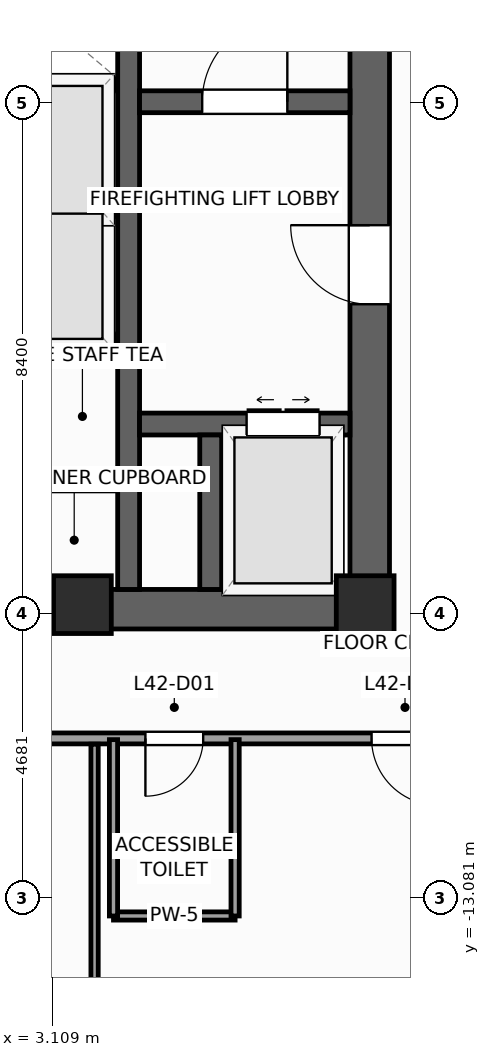
"""IFC4 building model, lengths in metres.
Left out: names, types, materials, properties, quantities, classifications, styles, units other than length and angle.
Written with IfcOpenShell. Run it as: python <this file> out.ifc"""

import sys

from ifc_helpers import new_model, si_unit, direction, frame, frame_2d, origin, origin_2d, place, context, subcontext, project, spatial, rectangle, extrude, source, transform, mapped, element, fill, save


model = new_model("IFC4")
c1 = context("Model", 3, precision=1e-05, world=origin(), true_north=direction((0.0, 1.0)))
c2 = subcontext(c1, "Body", "Model", "MODEL_VIEW")
j1 = project(units=[si_unit("LENGTHUNIT", "METRE"), si_unit("PLANEANGLEUNIT", "RADIAN")], contexts=[c1])
p1 = place(None, origin())
s1 = spatial("IfcSite", under=j1, at=p1, CompositionType="ELEMENT")
p2 = place(p1, origin())
s2 = spatial("IfcBuilding", under=s1, at=p2, CompositionType="ELEMENT")
p3 = place(p2, frame((0.0, 0.0, 176.4)))
s3 = spatial("IfcBuildingStorey", under=s2, at=p3, CompositionType="ELEMENT", Elevation=176.4)
p4 = place(p3, frame((-8.65, -8.325, 0.0), z_axis=(0.0, 0.0, 1.0), x_axis=(1.0, 0.0, 0.0)))
e1 = element("IfcWall", 1, at=p4, inside=s3, PredefinedType="SHEAR", context=c2, shape_type="SweptSolid", body=[
    extrude(rectangle(XDim=17.3, YDim=0.65, at=frame_2d((8.65, 0.0))), origin(), (0.0, 0.0, 1.0), 4.0),
])
p5 = place(p4, frame((8.0, 0.0, 0.0)))
e2 = element("IfcOpeningElement", 2, at=p5, cuts=e1, PredefinedType="OPENING", context=c2, shape_type="SweptSolid", body=[
    extrude(rectangle(XDim=1.3, YDim=2.2, at=frame_2d((0.65, 1.1))), frame((0.0, 0.335, 0.0), z_axis=(0.0, -1.0, 0.0), x_axis=(1.0, 0.0, 0.0)), (0.0, 0.0, 1.0), 0.67),
])
p6 = place(p3, frame((8.325, -8.0, 0.0), z_axis=(0.0, 0.0, 1.0), x_axis=(0.0, 1.0, 0.0)))
e3 = element("IfcWall", 3, at=p6, inside=s3, PredefinedType="SHEAR", context=c2, shape_type="SweptSolid", body=[
    extrude(rectangle(XDim=16.0, YDim=0.65, at=frame_2d((8.0, 0.0))), origin(), (0.0, 0.0, 1.0), 4.0),
])
p7 = place(p6, frame((4.69, 0.0, 0.0)))
e4 = element("IfcOpeningElement", 4, at=p7, cuts=e3, PredefinedType="OPENING", context=c2, shape_type="SweptSolid", body=[
    extrude(rectangle(XDim=1.3, YDim=2.2, at=frame_2d((0.65, 1.1))), frame((0.0, 0.335, 0.0), z_axis=(0.0, -1.0, 0.0), x_axis=(1.0, 0.0, 0.0)), (0.0, 0.0, 1.0), 0.67),
])
p8 = place(p3, frame((4.36, -8.0, 0.0), z_axis=(0.0, 0.0, 1.0), x_axis=(0.0, 1.0, 0.0)))
e5 = element("IfcWall", 5, at=p8, inside=s3, PredefinedType="SHEAR", context=c2, shape_type="SweptSolid", body=[
    extrude(rectangle(XDim=16.0, YDim=0.36, at=frame_2d((8.0, 0.0))), origin(), (0.0, 0.0, 1.0), 4.0),
])
p9 = place(p3, frame((4.54, 0.02, 0.0), z_axis=(0.0, 0.0, 1.0), x_axis=(1.0, 0.0, 0.0)))
e6 = element("IfcWall", 6, at=p9, inside=s3, PredefinedType="SHEAR", context=c2, shape_type="SweptSolid", body=[
    extrude(rectangle(XDim=3.46, YDim=0.36, at=frame_2d((1.73, 0.0))), origin(), (0.0, 0.0, 1.0), 4.0),
])
p10 = place(p9, frame((1.03, 0.0, 0.0)))
e7 = element("IfcOpeningElement", 7, at=p10, cuts=e6, PredefinedType="OPENING", context=c2, shape_type="SweptSolid", body=[
    extrude(rectangle(XDim=1.4, YDim=2.2, at=frame_2d((0.7, 1.1))), frame((0.0, 0.19, 0.0), z_axis=(0.0, -1.0, 0.0), x_axis=(1.0, 0.0, 0.0)), (0.0, 0.0, 1.0), 0.38),
])
p11 = place(p3, frame((4.54, -5.28, 0.0), z_axis=(0.0, 0.0, 1.0), x_axis=(1.0, 0.0, 0.0)))
e8 = element("IfcWall", 8, at=p11, inside=s3, PredefinedType="SHEAR", context=c2, shape_type="SweptSolid", body=[
    extrude(rectangle(XDim=3.46, YDim=0.36, at=frame_2d((1.73, 0.0))), origin(), (0.0, 0.0, 1.0), 4.0),
])
p12 = place(p11, frame((1.76, 0.0, 0.0)))
e9 = element("IfcOpeningElement", 9, at=p12, cuts=e8, PredefinedType="OPENING", context=c2, shape_type="SweptSolid", body=[
    extrude(rectangle(XDim=1.2, YDim=2.25, at=frame_2d((0.6, 1.125))), frame((0.0, 0.19, 0.0), z_axis=(0.0, -1.0, 0.0), x_axis=(1.0, 0.0, 0.0)), (0.0, 0.0, 1.0), 0.38),
])
p13 = place(p3, frame((5.71, -8.0, 0.0), z_axis=(0.0, 0.0, 1.0), x_axis=(0.0, 1.0, 0.0)))
e10 = element("IfcWall", 10, at=p13, inside=s3, PredefinedType="SHEAR", context=c2, shape_type="SweptSolid", body=[
    extrude(rectangle(XDim=2.54, YDim=0.36, at=frame_2d((1.27, 0.0))), origin(), (0.0, 0.0, 1.0), 4.0),
])
m1 = source(origin(), c2, "Body", "SweptSolid", [
    extrude(rectangle(XDim=0.95, YDim=0.95, at=origin_2d()), origin(), (0.0, 0.0, 1.0), 4.0),
])
for number, where, z_axis, x_axis in (
    (11, (8.25, -8.25, 0.0), (0.0, 0.0, 1.0), (1.0, 0.0, 0.0)),
    (12, (3.6, -8.25, 0.0), (0.0, 0.0, 1.0), (1.0, 0.0, 0.0)),
):
    element("IfcColumn", number, at=place(p3, frame(where, z_axis=z_axis, x_axis=x_axis)), inside=s3, PredefinedType="PILASTER", context=c2, shape_type="MappedRepresentation", body=[
        mapped(m1, transform((0.0, 0.0, 0.0), scale=1.0)),
    ])
p14 = place(p3, frame((-2.972, -32.558, 0.0), z_axis=(0.0, 0.0, 1.0), x_axis=(0.829036218961, 0.559194910251, 0.0)))
e13 = element("IfcWall", 13, at=p14, inside=s3, PredefinedType="STANDARD", context=c2, shape_type="SweptSolid", body=[
    extrude(rectangle(XDim=41.34, YDim=0.34, at=frame_2d((20.67, 0.0))), origin(), (0.0, 0.0, 1.0), 3.04),
])
p15 = place(p14, frame((14.545, 0.0, 0.0)))
e14 = element("IfcOpeningElement", 14, at=p15, cuts=e13, PredefinedType="OPENING", context=c2, shape_type="SweptSolid", body=[
    extrude(rectangle(XDim=1.05, YDim=2.25, at=frame_2d((0.525, 1.125))), frame((0.0, 0.18, 0.0), z_axis=(0.0, -1.0, 0.0), x_axis=(1.0, 0.0, 0.0)), (0.0, 0.0, 1.0), 0.36),
])
p16 = place(p14, frame((4.261, 0.0, 0.56)))
e15 = element("IfcOpeningElement", 15, at=p16, cuts=e13, PredefinedType="OPENING", context=c2, shape_type="SweptSolid", body=[
    extrude(rectangle(XDim=1.4, YDim=2.4, at=frame_2d((0.7, 1.2))), frame((0.0, 0.18, 0.0), z_axis=(0.0, -1.0, 0.0), x_axis=(1.0, 0.0, 0.0)), (0.0, 0.0, 1.0), 0.36),
])
p17 = place(p14, frame((11.064, 0.0, 0.61)))
e16 = element("IfcOpeningElement", 16, at=p17, cuts=e13, PredefinedType="OPENING", context=c2, shape_type="SweptSolid", body=[
    extrude(rectangle(XDim=1.85, YDim=2.35, at=frame_2d((0.925, 1.175))), frame((0.0, 0.18, 0.0), z_axis=(0.0, -1.0, 0.0), x_axis=(1.0, 0.0, 0.0)), (0.0, 0.0, 1.0), 0.36),
])
p18 = place(p14, frame((16.668, 0.0, 0.61)))
e17 = element("IfcOpeningElement", 17, at=p18, cuts=e13, PredefinedType="OPENING", context=c2, shape_type="SweptSolid", body=[
    extrude(rectangle(XDim=1.85, YDim=2.35, at=frame_2d((0.925, 1.175))), frame((0.0, 0.18, 0.0), z_axis=(0.0, -1.0, 0.0), x_axis=(1.0, 0.0, 0.0)), (0.0, 0.0, 1.0), 0.36),
])
p19 = place(p14, frame((27.186, 0.0, 0.61)))
e18 = element("IfcOpeningElement", 18, at=p19, cuts=e13, PredefinedType="OPENING", context=c2, shape_type="SweptSolid", body=[
    extrude(rectangle(XDim=1.85, YDim=2.35, at=frame_2d((0.925, 1.175))), frame((0.0, 0.18, 0.0), z_axis=(0.0, -1.0, 0.0), x_axis=(1.0, 0.0, 0.0)), (0.0, 0.0, 1.0), 0.36),
])
p20 = place(p14, frame((34.852, 0.0, 0.56)))
e19 = element("IfcOpeningElement", 19, at=p20, cuts=e13, PredefinedType="OPENING", context=c2, shape_type="SweptSolid", body=[
    extrude(rectangle(XDim=1.4, YDim=2.4, at=frame_2d((0.7, 1.2))), frame((0.0, 0.18, 0.0), z_axis=(0.0, -1.0, 0.0), x_axis=(1.0, 0.0, 0.0)), (0.0, 0.0, 1.0), 0.36),
])
for number, where, z_axis, x_axis in (
    (20, (1.89, -3.9, 0.0), (0.0, 0.0, 1.0), (1.0, 0.0, 0.0)),
    (21, (1.89, 0.3, 0.0), (0.0, 0.0, 1.0), (1.0, 0.0, 0.0)),
):
    element("IfcWall", number, at=place(p3, frame(where, z_axis=z_axis, x_axis=x_axis)), inside=s3, PredefinedType="PARTITIONING", context=c2, shape_type="SweptSolid", body=[
        extrude(rectangle(XDim=2.28, YDim=0.18, at=frame_2d((1.14, 0.0))), origin(), (0.0, 0.0, 1.0), 3.74),
    ])
p21 = place(p3, frame((1.9, -1.8, 0.0), z_axis=(0.0, 0.0, 1.0), x_axis=(1.0, 0.0, 0.0)))
e22 = element("IfcWall", 22, at=p21, inside=s3, PredefinedType="PARTITIONING", context=c2, shape_type="SweptSolid", body=[
    extrude(rectangle(XDim=2.26, YDim=0.12, at=frame_2d((1.13, 0.0))), origin(), (0.0, 0.0, 1.0), 3.74),
])
p22 = place(p3, frame((1.89, -6.3, 0.0), z_axis=(0.0, 0.0, 1.0), x_axis=(1.0, 0.0, 0.0)))
e23 = element("IfcWall", 23, at=p22, inside=s3, PredefinedType="PARTITIONING", context=c2, shape_type="SweptSolid", body=[
    extrude(rectangle(XDim=2.28, YDim=0.16, at=frame_2d((1.14, 0.0))), origin(), (0.0, 0.0, 1.0), 3.74),
])
p23 = place(p3, frame((-10.45, -10.45, 0.0), z_axis=(0.0, 0.0, 1.0), x_axis=(1.0, 0.0, 0.0)))
e24 = element("IfcWall", 24, at=p23, inside=s3, PredefinedType="PARTITIONING", context=c2, shape_type="SweptSolid", body=[
    extrude(rectangle(XDim=22.05, YDim=0.18, at=frame_2d((11.025, 0.0))), origin(), (0.0, 0.0, 1.0), 3.74),
])
p24 = place(p23, frame((15.086, 0.0, 0.0)))
e25 = element("IfcOpeningElement", 25, at=p24, cuts=e24, PredefinedType="OPENING", context=c2, shape_type="SweptSolid", body=[
    extrude(rectangle(XDim=0.95, YDim=2.1, at=frame_2d((0.475, 1.05))), frame((0.0, 0.1, 0.0), z_axis=(0.0, -1.0, 0.0), x_axis=(1.0, 0.0, 0.0)), (0.0, 0.0, 1.0), 0.2),
])
p25 = place(p23, frame((7.611, 0.0, 0.0)))
e26 = element("IfcOpeningElement", 26, at=p25, cuts=e24, PredefinedType="OPENING", context=c2, shape_type="SweptSolid", body=[
    extrude(rectangle(XDim=0.95, YDim=2.1, at=frame_2d((0.475, 1.05))), frame((0.0, 0.1, 0.0), z_axis=(0.0, -1.0, 0.0), x_axis=(1.0, 0.0, 0.0)), (0.0, 0.0, 1.0), 0.2),
])
p26 = place(p23, frame((2.939, 0.0, 0.0)))
e27 = element("IfcOpeningElement", 27, at=p26, cuts=e24, PredefinedType="OPENING", context=c2, shape_type="SweptSolid", body=[
    extrude(rectangle(XDim=1.1, YDim=2.2, at=frame_2d((0.55, 1.1))), frame((0.0, 0.1, 0.0), z_axis=(0.0, -1.0, 0.0), x_axis=(1.0, 0.0, 0.0)), (0.0, 0.0, 1.0), 0.2),
])
p27 = place(p23, frame((11.175, 0.0, 0.0)))
e28 = element("IfcOpeningElement", 28, at=p27, cuts=e24, PredefinedType="OPENING", context=c2, shape_type="SweptSolid", body=[
    extrude(rectangle(XDim=1.1, YDim=2.2, at=frame_2d((0.55, 1.1))), frame((0.0, 0.1, 0.0), z_axis=(0.0, -1.0, 0.0), x_axis=(1.0, 0.0, 0.0)), (0.0, 0.0, 1.0), 0.2),
])
p28 = place(p23, frame((18.805, 0.0, 0.0)))
e29 = element("IfcOpeningElement", 29, at=p28, cuts=e24, PredefinedType="OPENING", context=c2, shape_type="SweptSolid", body=[
    extrude(rectangle(XDim=1.1, YDim=2.2, at=frame_2d((0.55, 1.1))), frame((0.0, 0.1, 0.0), z_axis=(0.0, -1.0, 0.0), x_axis=(1.0, 0.0, 0.0)), (0.0, 0.0, 1.0), 0.2),
])
p29 = place(p3, frame((3.8, -27.864, 0.0), z_axis=(0.0, 0.0, 1.0), x_axis=(0.0, 1.0, 0.0)))
e30 = element("IfcWall", 30, at=p29, inside=s3, PredefinedType="PARTITIONING", context=c2, shape_type="SweptSolid", body=[
    extrude(rectangle(XDim=17.319, YDim=0.12, at=frame_2d((8.659, 0.0))), origin(), (0.0, 0.0, 1.0), 3.74),
])
p30 = place(p3, frame((4.111, -13.37, 0.0), z_axis=(0.0, 0.0, 1.0), x_axis=(1.0, 0.0, 0.0)))
e31 = element("IfcWall", 31, at=p30, inside=s3, PredefinedType="PARTITIONING", context=c2, shape_type="SweptSolid", body=[
    extrude(rectangle(XDim=2.0, YDim=0.135, at=frame_2d((1.0, 0.0))), origin(), (0.0, 0.0, 1.0), 2.84),
])
for number, where, z_axis, x_axis in (
    (32, (6.111, -13.37, 0.0), (0.0, 0.0, 1.0), (0.0, 1.0, 0.0)),
    (33, (4.111, -13.37, 0.0), (0.0, 0.0, 1.0), (0.0, 1.0, 0.0)),
):
    element("IfcWall", number, at=place(p3, frame(where, z_axis=z_axis, x_axis=x_axis)), inside=s3, PredefinedType="PARTITIONING", context=c2, shape_type="SweptSolid", body=[
        extrude(rectangle(XDim=2.9, YDim=0.135, at=frame_2d((1.45, 0.0))), origin(), (0.0, 0.0, 1.0), 3.74),
    ])
m2 = source(origin(), c2, "Body", "SweptSolid", [
    extrude(rectangle(XDim=1.4, YDim=2.2, at=frame_2d((0.7, 1.1))), frame((0.0, 0.025, 0.0), z_axis=(0.0, -1.0, 0.0), x_axis=(1.0, 0.0, 0.0)), (0.0, 0.0, 1.0), 0.05),
])
p31 = place(p10, origin())
e34 = element("IfcDoor", 34, at=p31, inside=s3, OperationType="SINGLE_SWING_RIGHT", PredefinedType="DOOR", context=c2, shape_type="MappedRepresentation", body=[
    mapped(m2, transform((0.0, 0.0, 0.0), scale=1.0)),
])
fill(e7, e34)
m3 = source(origin(), c2, "Body", "SweptSolid", [
    extrude(rectangle(XDim=1.3, YDim=2.2, at=frame_2d((0.65, 1.1))), frame((0.0, 0.025, 0.0), z_axis=(0.0, -1.0, 0.0), x_axis=(1.0, 0.0, 0.0)), (0.0, 0.0, 1.0), 0.05),
])
p32 = place(p7, origin())
e35 = element("IfcDoor", 35, at=p32, inside=s3, OperationType="SINGLE_SWING_RIGHT", PredefinedType="DOOR", context=c2, shape_type="MappedRepresentation", body=[
    mapped(m3, transform((0.0, 0.0, 0.0), scale=1.0)),
])
fill(e4, e35)
m4 = source(origin(), c2, "Body", "SweptSolid", [
    extrude(rectangle(XDim=1.2, YDim=2.25, at=frame_2d((0.6, 1.125))), frame((0.0, 0.025, 0.0), z_axis=(0.0, -1.0, 0.0), x_axis=(1.0, 0.0, 0.0)), (0.0, 0.0, 1.0), 0.05),
])
p33 = place(p12, origin())
e36 = element("IfcDoor", 36, at=p33, inside=s3, OperationType="DOUBLE_DOOR_SLIDING", PredefinedType="DOOR", context=c2, shape_type="MappedRepresentation", body=[
    mapped(m4, transform((0.0, 0.0, 0.0), scale=1.0)),
])
fill(e9, e36)
m5 = source(origin(), c2, "Body", "SweptSolid", [
    extrude(rectangle(XDim=0.95, YDim=2.1, at=frame_2d((0.475, 1.05))), frame((0.0, 0.025, 0.0), z_axis=(0.0, -1.0, 0.0), x_axis=(1.0, 0.0, 0.0)), (0.0, 0.0, 1.0), 0.05),
])
p34 = place(p24, frame((0.95, 0.0, 0.0), z_axis=(0.0, 0.0, 1.0), x_axis=(-1.0, 0.0, 0.0)))
e37 = element("IfcDoor", 37, at=p34, inside=s3, OperationType="SINGLE_SWING_LEFT", PredefinedType="DOOR", context=c2, shape_type="MappedRepresentation", body=[
    mapped(m5, transform((0.0, 0.0, 0.0), scale=1.0)),
])
fill(e25, e37)
m6 = source(origin(), c2, "Body", "SweptSolid", [
    extrude(rectangle(XDim=1.1, YDim=2.2, at=frame_2d((0.55, 1.1))), frame((0.0, 0.025, 0.0), z_axis=(0.0, -1.0, 0.0), x_axis=(1.0, 0.0, 0.0)), (0.0, 0.0, 1.0), 0.05),
])
p35 = place(p28, frame((1.1, 0.0, 0.0), z_axis=(0.0, 0.0, 1.0), x_axis=(-1.0, 0.0, 0.0)))
e38 = element("IfcDoor", 38, at=p35, inside=s3, OperationType="SINGLE_SWING_RIGHT", PredefinedType="DOOR", context=c2, shape_type="MappedRepresentation", body=[
    mapped(m6, transform((0.0, 0.0, 0.0), scale=1.0)),
])
fill(e29, e38)
save(model, sys.argv[1])
